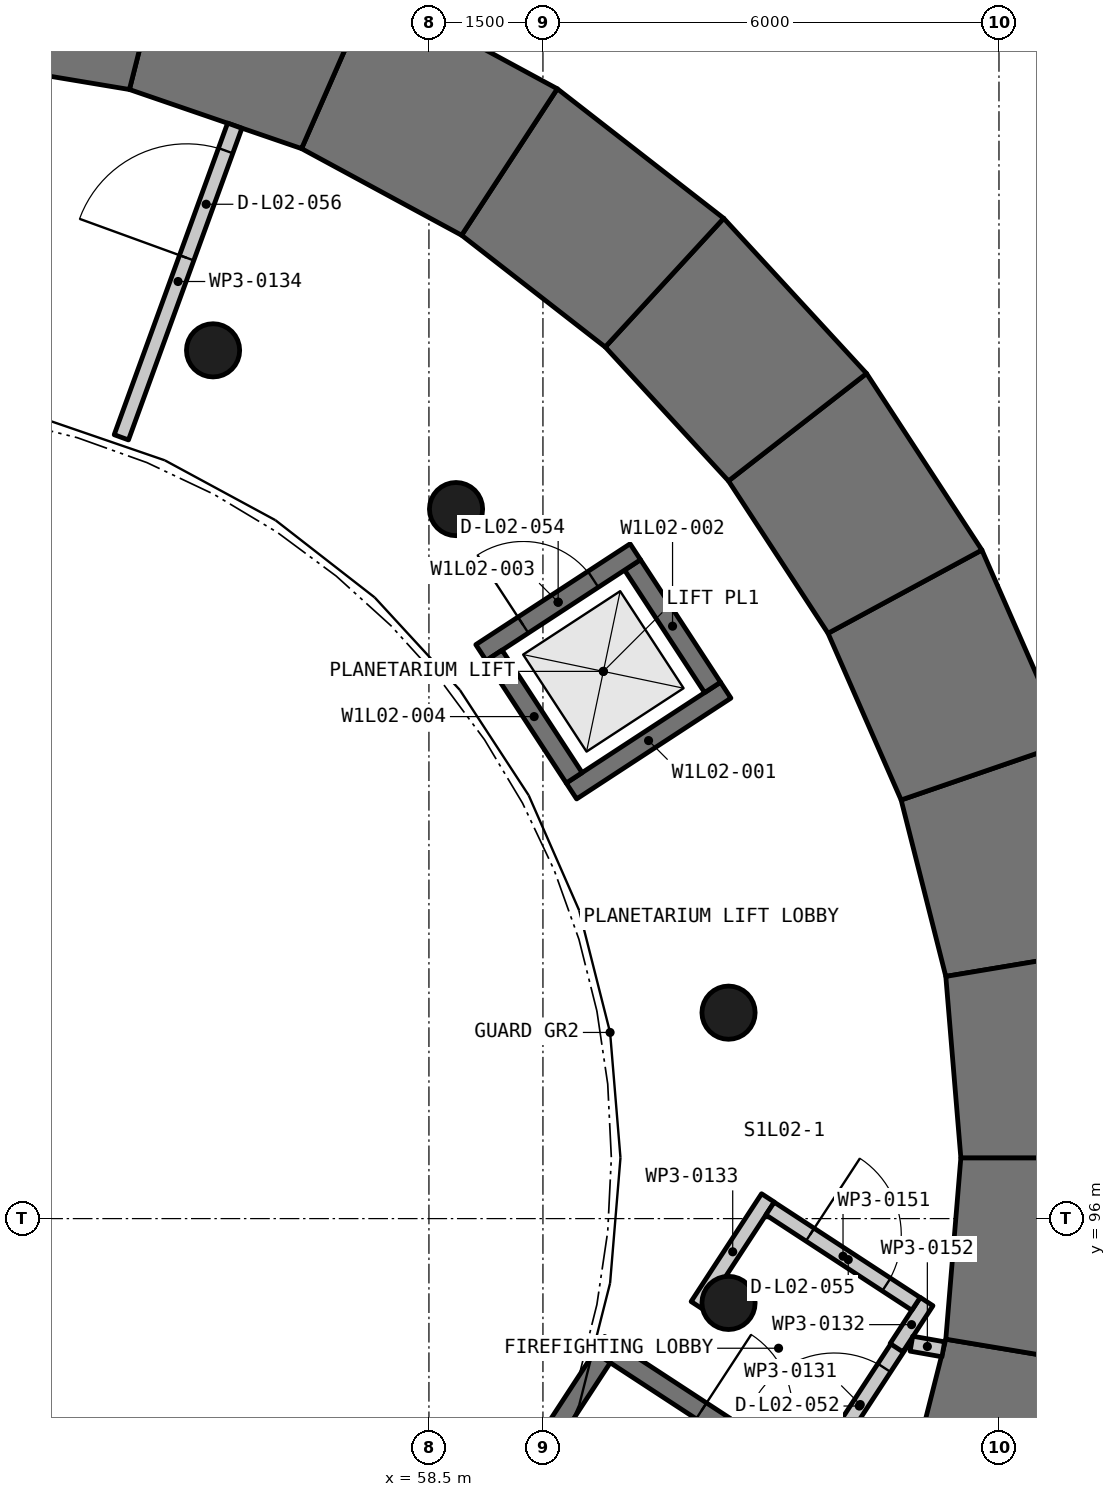
"""IFC4 building model, lengths in metres.
Left out: names, types, materials, properties, quantities, classifications, styles, units other than length and angle.
Written with IfcOpenShell. Run it as: python <this file> out.ifc"""

import sys

from ifc_helpers import new_model, si_unit, direction, frame, frame_2d, origin, origin_2d, place, context, subcontext, project, spatial, polyline, rectangle, circle, outline, extrude, element, fill, save


model = new_model("IFC4")
c1 = context("Model", 3, precision=1e-05, world=origin(), true_north=direction((0.0, 1.0)))
c2 = subcontext(c1, "Body", "Model", "MODEL_VIEW")
j1 = project(units=[si_unit("LENGTHUNIT", "METRE"), si_unit("PLANEANGLEUNIT", "RADIAN")], contexts=[c1])
p1 = place(None, origin())
s1 = spatial("IfcSite", under=j1, at=p1, CompositionType="ELEMENT")
p2 = place(p1, origin())
s2 = spatial("IfcBuilding", under=s1, at=p2, CompositionType="ELEMENT")
p3 = place(p2, frame((0.0, 0.0, 11.25)))
s3 = spatial("IfcBuildingStorey", under=s2, at=p3, CompositionType="ELEMENT", Elevation=11.25)
for number, where, z_axis, x_axis in (
    (1, (62.442, 98.709, -0.3), (0.0, 0.0, 1.0), (1.0, 0.0, 0.0)),
    (2, (58.856, 105.334, -0.3), (0.0, 0.0, 1.0), (1.0, 0.0, 0.0)),
    (3, (55.66, 107.423, -0.3), (0.0, 0.0, 1.0), (1.0, 0.0, 0.0)),
    (4, (62.442, 94.891, -0.3), (0.0, 0.0, 1.0), (1.0, 0.0, 0.0)),
):
    element("IfcColumn", number, at=place(p3, frame(where, z_axis=z_axis, x_axis=x_axis)), inside=s3, PredefinedType="COLUMN", context=c2, shape_type="SweptSolid", body=[
        extrude(circle(Radius=0.35, at=origin_2d()), origin(), (0.0, 0.0, 1.0), 4.5),
    ])
p4 = place(p3, frame((66.459, 99.284, -0.3), z_axis=(0.0, 0.0, 1.0), x_axis=(-0.24549513697, 0.96939782222, 0.0)))
e5 = element("IfcWall", 5, at=p4, inside=s3, PredefinedType="SHEAR", context=c2, shape_type="SweptSolid", body=[
    extrude(outline(polyline([(0.0, -1.147), (2.775, -1.147), (2.584, 1.147), (0.19, 1.147), (0.0, -1.147)])), origin(), (0.0, 0.0, 1.0), 2.25),
])
p5 = place(p3, frame((65.839, 101.794, -0.3), z_axis=(0.0, 0.0, 1.0), x_axis=(-0.401667968165, 0.915785369696, 0.0)))
e6 = element("IfcWall", 6, at=p5, inside=s3, PredefinedType="SHEAR", context=c2, shape_type="SweptSolid", body=[
    extrude(outline(polyline([(0.0, -1.147), (2.775, -1.147), (2.584, 1.147), (0.19, 1.147), (0.0, -1.147)])), origin(), (0.0, 0.0, 1.0), 2.25),
])
p6 = place(p3, frame((64.815, 104.169, -0.3), z_axis=(0.0, 0.0, 1.0), x_axis=(-0.546960095535, 0.83715867904, 0.0)))
e7 = element("IfcWall", 7, at=p6, inside=s3, PredefinedType="SHEAR", context=c2, shape_type="SweptSolid", body=[
    extrude(outline(polyline([(-0.0, -1.147), (2.775, -1.147), (2.584, 1.147), (0.19, 1.147), (-0.0, -1.147)])), origin(), (0.0, 0.0, 1.0), 2.25),
])
p7 = place(p3, frame((63.414, 106.342, -0.3), z_axis=(0.0, 0.0, 1.0), x_axis=(-0.677336688258, 0.735673168424, 0.0)))
e8 = element("IfcWall", 8, at=p7, inside=s3, PredefinedType="SHEAR", context=c2, shape_type="SweptSolid", body=[
    extrude(outline(polyline([(0.0, -1.147), (2.774, -1.147), (2.585, 1.147), (0.19, 1.147), (0.0, -1.147)])), origin(), (0.0, 0.0, 1.0), 2.25),
])
p8 = place(p3, frame((61.674, 108.255, -0.3), z_axis=(0.0, 0.0, 1.0), x_axis=(-0.789143690206, 0.614208625963, 0.0)))
e9 = element("IfcWall", 9, at=p8, inside=s3, PredefinedType="SHEAR", context=c2, shape_type="SweptSolid", body=[
    extrude(outline(polyline([(-0.0, -1.147), (2.775, -1.147), (2.585, 1.147), (0.19, 1.147), (-0.0, -1.147)])), origin(), (0.0, 0.0, 1.0), 2.25),
])
p9 = place(p3, frame((59.643, 109.856, -0.3), z_axis=(0.0, 0.0, 1.0), x_axis=(-0.879474616981, 0.475945793222, 0.0)))
e10 = element("IfcWall", 10, at=p9, inside=s3, PredefinedType="SHEAR", context=c2, shape_type="SweptSolid", body=[
    extrude(outline(polyline([(0.0, -1.147), (2.775, -1.147), (2.584, 1.147), (0.19, 1.147), (0.0, -1.147)])), origin(), (0.0, 0.0, 1.0), 2.25),
])
p10 = place(p3, frame((57.376, 111.1, -0.3), z_axis=(0.0, 0.0, 1.0), x_axis=(-0.945793902018, 0.324767447423, 0.0)))
e11 = element("IfcWall", 11, at=p10, inside=s3, PredefinedType="SHEAR", context=c2, shape_type="SweptSolid", body=[
    extrude(outline(polyline([(0.0, -1.147), (2.775, -1.147), (2.584, 1.147), (0.19, 1.147), (0.0, -1.147)])), origin(), (0.0, 0.0, 1.0), 2.25),
])
p11 = place(p3, frame((54.935, 111.955, -0.3), z_axis=(0.0, 0.0, 1.0), x_axis=(-0.986355848148, 0.164627278491, 0.0)))
e12 = element("IfcWall", 12, at=p11, inside=s3, PredefinedType="SHEAR", context=c2, shape_type="SweptSolid", body=[
    extrude(outline(polyline([(-0.0, -1.147), (2.775, -1.147), (2.584, 1.147), (0.19, 1.147), (-0.0, -1.147)])), origin(), (0.0, 0.0, 1.0), 2.25),
])
p12 = place(p3, frame((65.778, 91.627, -0.3), z_axis=(0.0, 0.0, 1.0), x_axis=(0.24549513697, 0.96939782222, 0.0)))
e13 = element("IfcWall", 13, at=p12, inside=s3, PredefinedType="SHEAR", context=c2, shape_type="SweptSolid", body=[
    extrude(outline(polyline([(-0.0, -1.147), (2.775, -1.147), (2.585, 1.147), (0.19, 1.147), (-0.0, -1.147)])), origin(), (0.0, 0.0, 1.0), 2.25),
])
p13 = place(p3, frame((66.428, 94.13, -0.3), z_axis=(0.0, 0.0, 1.0), x_axis=(0.082535726981, 0.996588106377, 0.0)))
e14 = element("IfcWall", 14, at=p13, inside=s3, PredefinedType="SHEAR", context=c2, shape_type="SweptSolid", body=[
    extrude(outline(polyline([(0.0, -1.147), (2.775, -1.147), (2.584, 1.147), (0.19, 1.147), (0.0, -1.147)])), origin(), (0.0, 0.0, 1.0), 2.25),
])
p14 = place(p3, frame((66.657, 96.705, -0.3), z_axis=(0.0, 0.0, 1.0), x_axis=(-0.082535726981, 0.996588106377, 0.0)))
e15 = element("IfcWall", 15, at=p14, inside=s3, PredefinedType="SHEAR", context=c2, shape_type="SweptSolid", body=[
    extrude(outline(polyline([(0.0, -1.147), (2.775, -1.147), (2.584, 1.147), (0.19, 1.147), (0.0, -1.147)])), origin(), (0.0, 0.0, 1.0), 2.25),
])
p15 = place(p3, frame((66.157, 99.258, 1.95), z_axis=(0.0, 0.0, 1.0), x_axis=(-0.245454430511, 0.969408130017, 0.0)))
e16 = element("IfcWall", 16, at=p15, inside=s3, PredefinedType="SHEAR", context=c2, shape_type="SweptSolid", body=[
    extrude(outline(polyline([(-0.0, -0.848), (2.676, -0.848), (2.535, 0.848), (0.14, 0.848), (-0.0, -0.848)])), origin(), (0.0, 0.0, 1.0), 2.25),
])
p16 = place(p3, frame((65.546, 101.719, 1.95), z_axis=(0.0, 0.0, 1.0), x_axis=(-0.401680291361, 0.915779964583, 0.0)))
e17 = element("IfcWall", 17, at=p16, inside=s3, PredefinedType="SHEAR", context=c2, shape_type="SweptSolid", body=[
    extrude(outline(polyline([(0.0, -0.848), (2.676, -0.848), (2.535, 0.848), (0.141, 0.848), (0.0, -0.848)])), origin(), (0.0, 0.0, 1.0), 2.25),
])
p17 = place(p3, frame((64.538, 104.047, 1.95), z_axis=(0.0, 0.0, 1.0), x_axis=(-0.546969049206, 0.837152829065, 0.0)))
e18 = element("IfcWall", 18, at=p17, inside=s3, PredefinedType="SHEAR", context=c2, shape_type="SweptSolid", body=[
    extrude(outline(polyline([(-0.0, -0.848), (2.676, -0.848), (2.535, 0.848), (0.14, 0.848), (-0.0, -0.848)])), origin(), (0.0, 0.0, 1.0), 2.25),
])
p18 = place(p3, frame((63.16, 106.176, 1.95), z_axis=(0.0, 0.0, 1.0), x_axis=(-0.677256164306, 0.735747298949, 0.0)))
e19 = element("IfcWall", 19, at=p18, inside=s3, PredefinedType="SHEAR", context=c2, shape_type="SweptSolid", body=[
    extrude(outline(polyline([(-0.0, -0.848), (2.676, -0.848), (2.535, 0.848), (0.14, 0.848), (-0.0, -0.848)])), origin(), (0.0, 0.0, 1.0), 2.25),
])
p19 = place(p3, frame((61.451, 108.05, 1.95), z_axis=(0.0, 0.0, 1.0), x_axis=(-0.789140888872, 0.614212225139, 0.0)))
e20 = element("IfcWall", 20, at=p19, inside=s3, PredefinedType="SHEAR", context=c2, shape_type="SweptSolid", body=[
    extrude(outline(polyline([(0.0, -0.848), (2.676, -0.848), (2.535, 0.848), (0.141, 0.848), (0.0, -0.848)])), origin(), (0.0, 0.0, 1.0), 2.25),
])
p20 = place(p3, frame((59.457, 109.616, 1.95), z_axis=(0.0, 0.0, 1.0), x_axis=(-0.879467057999, 0.475959760793, 0.0)))
e21 = element("IfcWall", 21, at=p20, inside=s3, PredefinedType="SHEAR", context=c2, shape_type="SweptSolid", body=[
    extrude(outline(polyline([(0.0, -0.848), (2.676, -0.848), (2.535, 0.848), (0.141, 0.848), (0.0, -0.848)])), origin(), (0.0, 0.0, 1.0), 2.25),
])
p21 = place(p3, frame((57.232, 110.833, 1.95), z_axis=(0.0, 0.0, 1.0), x_axis=(-0.945807498305, 0.32472784936, 0.0)))
e22 = element("IfcWall", 22, at=p21, inside=s3, PredefinedType="SHEAR", context=c2, shape_type="SweptSolid", body=[
    extrude(outline(polyline([(0.0, -0.848), (2.676, -0.848), (2.535, 0.848), (0.14, 0.848), (0.0, -0.848)])), origin(), (0.0, 0.0, 1.0), 2.25),
])
p22 = place(p3, frame((54.837, 111.668, 1.95), z_axis=(0.0, 0.0, 1.0), x_axis=(-0.986359376913, 0.164606134686, 0.0)))
e23 = element("IfcWall", 23, at=p22, inside=s3, PredefinedType="SHEAR", context=c2, shape_type="SweptSolid", body=[
    extrude(outline(polyline([(0.0, -0.848), (2.676, -0.848), (2.535, 0.848), (0.141, 0.848), (0.0, -0.848)])), origin(), (0.0, 0.0, 1.0), 2.25),
])
p23 = place(p3, frame((65.5, 91.748, 1.95), z_axis=(0.0, 0.0, 1.0), x_axis=(0.245454430511, 0.969408130017, 0.0)))
e24 = element("IfcWall", 24, at=p23, inside=s3, PredefinedType="SHEAR", context=c2, shape_type="SweptSolid", body=[
    extrude(outline(polyline([(0.0, -0.848), (2.676, -0.848), (2.535, 0.848), (0.14, 0.848), (0.0, -0.848)])), origin(), (0.0, 0.0, 1.0), 2.25),
])
p24 = place(p3, frame((66.134, 94.204, 1.95), z_axis=(0.0, 0.0, 1.0), x_axis=(0.082577286265, 0.996584663635, 0.0)))
e25 = element("IfcWall", 25, at=p24, inside=s3, PredefinedType="SHEAR", context=c2, shape_type="SweptSolid", body=[
    extrude(outline(polyline([(0.0, -0.848), (2.676, -0.848), (2.535, 0.848), (0.141, 0.848), (0.0, -0.848)])), origin(), (0.0, 0.0, 1.0), 2.25),
])
p25 = place(p3, frame((66.355, 96.73, 1.95), z_axis=(0.0, 0.0, 1.0), x_axis=(-0.082577286265, 0.996584663635, 0.0)))
e26 = element("IfcWall", 26, at=p25, inside=s3, PredefinedType="SHEAR", context=c2, shape_type="SweptSolid", body=[
    extrude(outline(polyline([(0.0, -0.848), (2.676, -0.848), (2.535, 0.848), (0.141, 0.848), (0.0, -0.848)])), origin(), (0.0, 0.0, 1.0), 2.25),
])
p26 = place(p3, frame((60.375, 101.626, -0.3), z_axis=(0.0, 0.0, 1.0), x_axis=(0.83717173143, 0.546940117467, 0.0)))
e27 = element("IfcWall", 27, at=p26, inside=s3, PredefinedType="SHEAR", context=c2, shape_type="SweptSolid", body=[
    extrude(rectangle(XDim=2.425, YDim=0.25, at=frame_2d((1.212, 0.0))), origin(), (0.0, 0.0, 1.0), 4.5),
])
p27 = place(p3, frame((62.232, 102.988, -0.3), z_axis=(0.0, 0.0, 1.0), x_axis=(-0.546979396142, 0.837146068614, 0.0)))
e28 = element("IfcWall", 28, at=p27, inside=s3, PredefinedType="SHEAR", context=c2, shape_type="SweptSolid", body=[
    extrude(rectangle(XDim=1.925, YDim=0.25, at=frame_2d((0.962, 0.0))), origin(), (0.0, 0.0, 1.0), 4.5),
])
p28 = place(p3, frame((59.185, 103.447, -0.3), z_axis=(0.0, 0.0, 1.0), x_axis=(0.837141612847, 0.546986215586, 0.0)))
e29 = element("IfcWall", 29, at=p28, inside=s3, PredefinedType="SHEAR", context=c2, shape_type="SweptSolid", body=[
    extrude(rectangle(XDim=2.425, YDim=0.25, at=frame_2d((1.212, 0.0))), origin(), (0.0, 0.0, 1.0), 4.5),
])
p29 = place(p28, frame((0.663, 0.0, 0.3)))
e30 = element("IfcOpeningElement", 30, at=p29, cuts=e29, PredefinedType="OPENING", context=c2, shape_type="SweptSolid", body=[
    extrude(rectangle(XDim=1.1, YDim=2.1, at=frame_2d((0.55, 1.05))), frame((0.0, 0.135, 0.0), z_axis=(0.0, -1.0, 0.0), x_axis=(1.0, 0.0, 0.0)), (0.0, 0.0, 1.0), 0.27),
])
p30 = place(p3, frame((60.411, 101.799, -0.3), z_axis=(0.0, 0.0, 1.0), x_axis=(-0.547037472582, 0.837108119416, 0.0)))
e31 = element("IfcWall", 31, at=p30, inside=s3, PredefinedType="SHEAR", context=c2, shape_type="SweptSolid", body=[
    extrude(rectangle(XDim=1.925, YDim=0.25, at=frame_2d((0.962, 0.0))), origin(), (0.0, 0.0, 1.0), 4.5),
])
p31 = place(p3, frame((60.744, 94.346, -0.3), z_axis=(0.0, 0.0, 1.0), x_axis=(0.837178733665, -0.546929399373, 0.0)))
e32 = element("IfcWall", 32, at=p31, inside=s3, PredefinedType="SHEAR", context=c2, shape_type="SweptSolid", body=[
    extrude(rectangle(XDim=4.4, YDim=0.25, at=frame_2d((2.2, 0.0))), origin(), (0.0, 0.0, 1.0), 4.5),
])
p32 = place(p31, frame((1.601, 0.0, 0.3)))
e33 = element("IfcOpeningElement", 33, at=p32, cuts=e32, PredefinedType="OPENING", context=c2, shape_type="SweptSolid", body=[
    extrude(rectangle(XDim=1.2, YDim=2.2, at=frame_2d((0.6, 1.1))), frame((0.0, 0.135, 0.0), z_axis=(0.0, -1.0, 0.0), x_axis=(1.0, 0.0, 0.0)), (0.0, 0.0, 1.0), 0.27),
])
p33 = place(p3, frame((57.335, 88.898, -0.3), z_axis=(0.0, 0.0, 1.0), x_axis=(0.546922510141, 0.837183234364, 0.0)))
e34 = element("IfcWall", 34, at=p33, inside=s3, PredefinedType="SHEAR", context=c2, shape_type="SweptSolid", body=[
    extrude(rectangle(XDim=6.3, YDim=0.25, at=frame_2d((3.15, 0.0))), origin(), (0.0, 0.0, 1.0), 4.5),
])
p34 = place(p3, frame((63.581, 92.644, 0.0), z_axis=(0.0, 0.0, 1.0), x_axis=(0.546949633936, 0.837165514063, 0.0)))
e35 = element("IfcWall", 35, at=p34, inside=s3, PredefinedType="PARTITIONING", context=c2, shape_type="SweptSolid", body=[
    extrude(rectangle(XDim=2.173, YDim=0.2, at=frame_2d((1.086, 0.0))), origin(), (0.0, 0.0, 1.0), 4.2),
])
p35 = place(p34, frame((0.463, 0.0, 0.0)))
e36 = element("IfcOpeningElement", 36, at=p35, cuts=e35, PredefinedType="OPENING", context=c2, shape_type="SweptSolid", body=[
    extrude(rectangle(XDim=1.2, YDim=2.1, at=frame_2d((0.6, 1.05))), frame((0.0, 0.11, 0.0), z_axis=(0.0, -1.0, 0.0), x_axis=(1.0, 0.0, 0.0)), (0.0, 0.0, 1.0), 0.22),
])
p36 = place(p3, frame((64.652, 94.302, 0.0), z_axis=(0.0, 0.0, 1.0), x_axis=(0.54690452618, 0.837194982811, 0.0)))
e37 = element("IfcWall", 37, at=p36, inside=s3, PredefinedType="PARTITIONING", context=c2, shape_type="SweptSolid", body=[
    extrude(rectangle(XDim=0.725, YDim=0.2, at=frame_2d((0.362, 0.0))), origin(), (0.0, 0.0, 1.0), 4.2),
])
p37 = place(p3, frame((62.033, 94.854, 0.0), z_axis=(0.0, 0.0, 1.0), x_axis=(0.546962048529, 0.837157403043, 0.0)))
e38 = element("IfcWall", 38, at=p37, inside=s3, PredefinedType="PARTITIONING", context=c2, shape_type="SweptSolid", body=[
    extrude(rectangle(XDim=1.694, YDim=0.2, at=frame_2d((0.847, 0.0))), origin(), (0.0, 0.0, 1.0), 3.4),
])
p38 = place(p3, frame((54.453, 106.279, 0.0), z_axis=(0.0, 0.0, 1.0), x_axis=(0.342044051152, 0.939683918704, 0.0)))
e39 = element("IfcWall", 39, at=p38, inside=s3, PredefinedType="PARTITIONING", context=c2, shape_type="SweptSolid", body=[
    extrude(rectangle(XDim=4.363, YDim=0.2, at=frame_2d((2.182, 0.0))), origin(), (0.0, 0.0, 1.0), 3.4),
])
p39 = place(p38, frame((2.513, 0.0, 0.0)))
e40 = element("IfcOpeningElement", 40, at=p39, cuts=e39, PredefinedType="OPENING", context=c2, shape_type="SweptSolid", body=[
    extrude(rectangle(XDim=1.5, YDim=2.1, at=frame_2d((0.75, 1.05))), frame((0.0, 0.11, 0.0), z_axis=(0.0, -1.0, 0.0), x_axis=(1.0, 0.0, 0.0)), (0.0, 0.0, 1.0), 0.22),
])
p40 = place(p3, frame((62.988, 96.133, 0.0), z_axis=(0.0, 0.0, 1.0), x_axis=(0.837155155432, -0.546965488613, 0.0)))
e41 = element("IfcWall", 41, at=p40, inside=s3, PredefinedType="PARTITIONING", context=c2, shape_type="SweptSolid", body=[
    extrude(rectangle(XDim=2.294, YDim=0.2, at=frame_2d((1.147, 0.0))), origin(), (0.0, 0.0, 1.0), 4.2),
])
p41 = place(p40, frame((0.629, 0.0, 0.0)))
e42 = element("IfcOpeningElement", 42, at=p41, cuts=e41, PredefinedType="OPENING", context=c2, shape_type="SweptSolid", body=[
    extrude(rectangle(XDim=1.2, YDim=2.1, at=frame_2d((0.6, 1.05))), frame((0.0, 0.11, 0.0), z_axis=(0.0, -1.0, 0.0), x_axis=(1.0, 0.0, 0.0)), (0.0, 0.0, 1.0), 0.22),
])
p42 = place(p3, frame((65.267, 94.281, 0.0), z_axis=(0.0, 0.0, 1.0), x_axis=(-0.984783558818, 0.173785333909, 0.0)))
e43 = element("IfcWall", 43, at=p42, inside=s3, PredefinedType="PARTITIONING", context=c2, shape_type="SweptSolid", body=[
    extrude(rectangle(XDim=0.426, YDim=0.2, at=frame_2d((0.213, 0.0))), origin(), (0.0, 0.0, 1.0), 4.2),
])
p43 = place(p32, origin())
e44 = element("IfcDoor", 44, at=p43, inside=s3, OperationType="SINGLE_SWING_RIGHT", PredefinedType="DOOR", context=c2, shape_type="SweptSolid", body=[
    extrude(rectangle(XDim=1.2, YDim=2.2, at=frame_2d((0.6, 1.1))), frame((0.0, 0.025, 0.0), z_axis=(0.0, -1.0, 0.0), x_axis=(1.0, 0.0, 0.0)), (0.0, 0.0, 1.0), 0.05),
])
fill(e33, e44)
p44 = place(p35, origin())
e45 = element("IfcDoor", 45, at=p44, inside=s3, OperationType="SINGLE_SWING_RIGHT", PredefinedType="DOOR", context=c2, shape_type="SweptSolid", body=[
    extrude(rectangle(XDim=1.2, YDim=2.1, at=frame_2d((0.6, 1.05))), frame((0.0, 0.025, 0.0), z_axis=(0.0, -1.0, 0.0), x_axis=(1.0, 0.0, 0.0)), (0.0, 0.0, 1.0), 0.05),
])
fill(e36, e45)
p45 = place(p29, origin())
e46 = element("IfcDoor", 46, at=p45, inside=s3, OperationType="DOUBLE_DOOR_SLIDING", PredefinedType="DOOR", context=c2, shape_type="SweptSolid", body=[
    extrude(rectangle(XDim=1.1, YDim=2.1, at=frame_2d((0.55, 1.05))), frame((0.0, 0.025, 0.0), z_axis=(0.0, -1.0, 0.0), x_axis=(1.0, 0.0, 0.0)), (0.0, 0.0, 1.0), 0.05),
])
fill(e30, e46)
p46 = place(p41, origin())
e47 = element("IfcDoor", 47, at=p46, inside=s3, OperationType="SINGLE_SWING_LEFT", PredefinedType="DOOR", context=c2, shape_type="SweptSolid", body=[
    extrude(rectangle(XDim=1.2, YDim=2.1, at=frame_2d((0.6, 1.05))), frame((0.0, 0.025, 0.0), z_axis=(0.0, -1.0, 0.0), x_axis=(1.0, 0.0, 0.0)), (0.0, 0.0, 1.0), 0.05),
])
fill(e42, e47)
p47 = place(p39, origin())
e48 = element("IfcDoor", 48, at=p47, inside=s3, OperationType="DOUBLE_DOOR_SINGLE_SWING", PredefinedType="DOOR", context=c2, shape_type="SweptSolid", body=[
    extrude(rectangle(XDim=1.5, YDim=2.1, at=frame_2d((0.75, 1.05))), frame((0.0, 0.025, 0.0), z_axis=(0.0, -1.0, 0.0), x_axis=(1.0, 0.0, 0.0)), (0.0, 0.0, 1.0), 0.05),
])
fill(e40, e48)
save(model, sys.argv[1])
